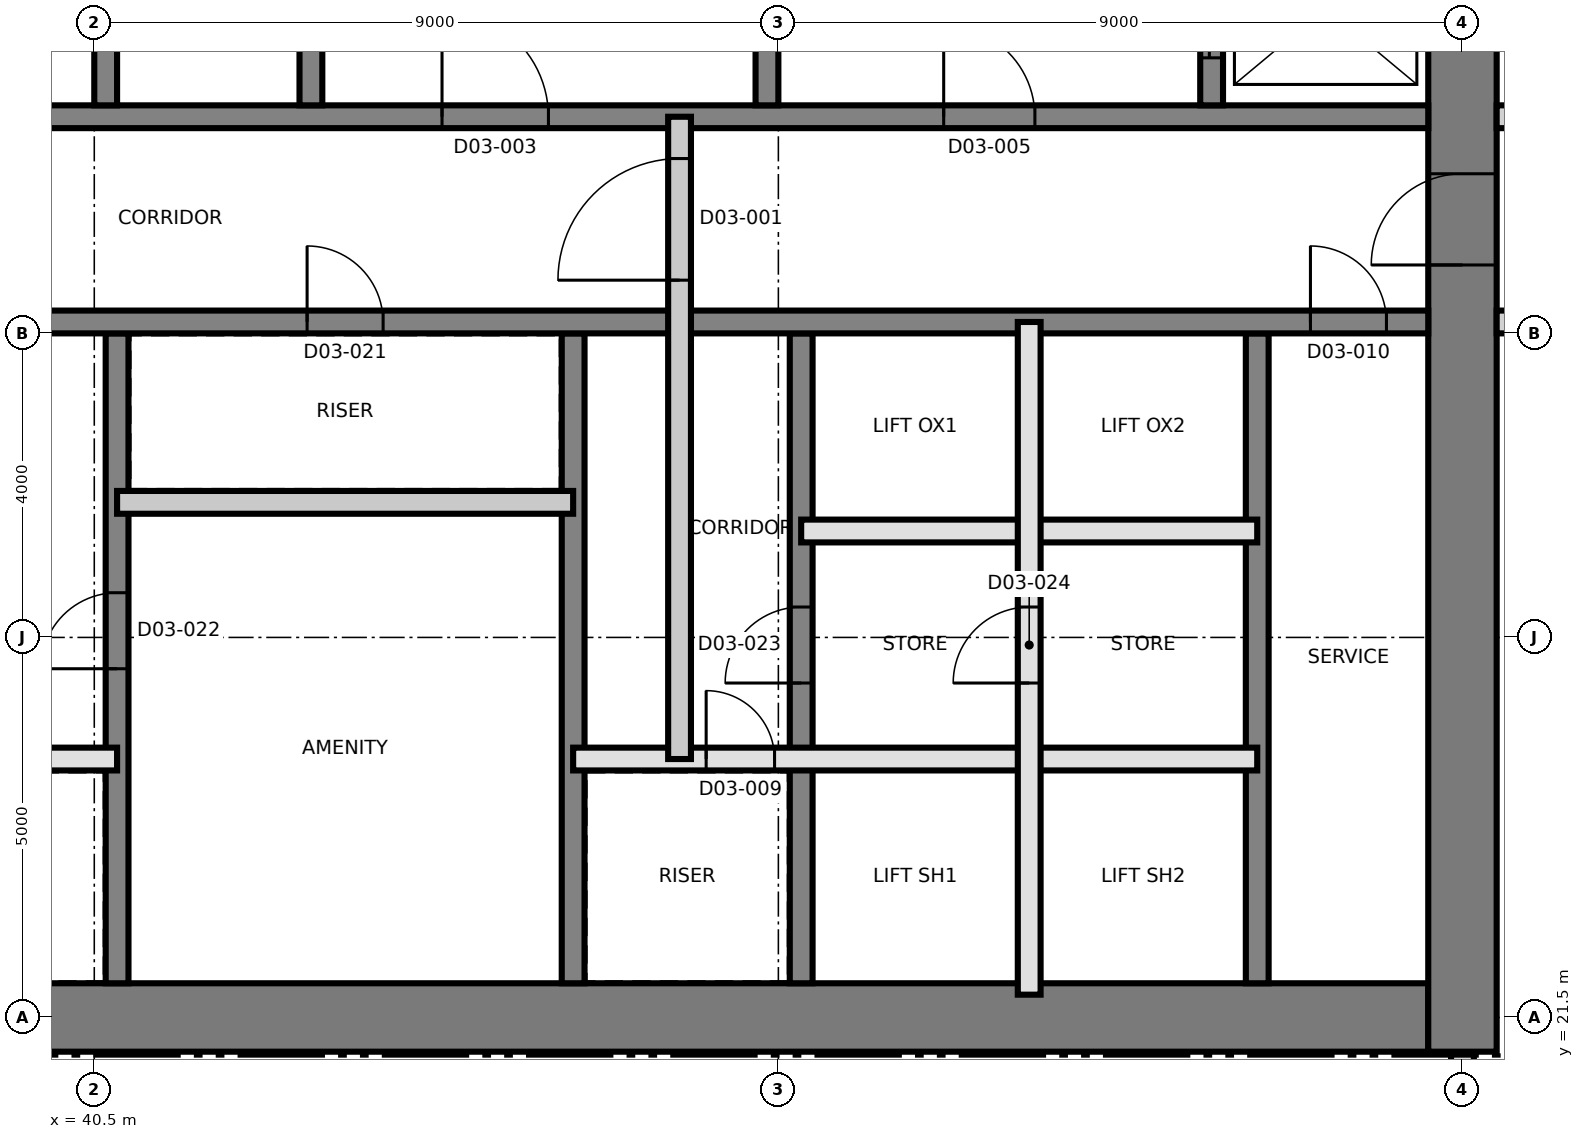
"""IFC4 building model, lengths in metres.
Left out: names, types, materials, properties, quantities, classifications, styles, units other than length and angle.
Written with IfcOpenShell. Run it as: python <this file> out.ifc"""

import sys

from ifc_helpers import new_model, si_unit, direction, frame, frame_2d, origin, place, context, subcontext, project, spatial, rectangle, extrude, element, fill, save


model = new_model("IFC4")
c1 = context("Model", 3, precision=1e-05, world=origin(), true_north=direction((0.0, 1.0)))
c2 = subcontext(c1, "Body", "Model", "MODEL_VIEW")
j1 = project(units=[si_unit("LENGTHUNIT", "METRE"), si_unit("PLANEANGLEUNIT", "RADIAN")], contexts=[c1])
p1 = place(None, origin())
s1 = spatial("IfcSite", under=j1, at=p1, CompositionType="ELEMENT")
p2 = place(p1, origin())
s2 = spatial("IfcBuilding", under=s1, at=p2, CompositionType="ELEMENT")
p3 = place(p2, frame((0.0, 0.0, 59.4)))
s3 = spatial("IfcBuildingStorey", under=s2, at=p3, CompositionType="ELEMENT", Elevation=59.4)
p4 = place(p3, frame((31.05, 21.5, 0.0), z_axis=(0.0, 0.0, 1.0), x_axis=(1.0, 0.0, 0.0)))
e1 = element("IfcWall", 1, at=p4, inside=s3, PredefinedType="SHEAR", context=c2, shape_type="SweptSolid", body=[
    extrude(rectangle(XDim=27.0, YDim=0.9, at=frame_2d((13.5, 0.0))), origin(), (0.0, 0.0, 1.0), 3.7),
])
p5 = place(p3, frame((58.5, 21.05, 0.0), z_axis=(0.0, 0.0, 1.0), x_axis=(0.0, 1.0, 0.0)))
e2 = element("IfcWall", 2, at=p5, inside=s3, PredefinedType="SHEAR", context=c2, shape_type="SweptSolid", body=[
    extrude(rectangle(XDim=18.9, YDim=0.9, at=frame_2d((9.45, 0.0))), origin(), (0.0, 0.0, 1.0), 3.7),
])
p6 = place(p5, frame((10.35, 0.0, 0.0)))
e3 = element("IfcOpeningElement", 3, at=p6, cuts=e2, PredefinedType="OPENING", context=c2, shape_type="SweptSolid", body=[
    extrude(rectangle(XDim=1.2, YDim=2.1, at=frame_2d((0.6, 1.05))), frame((0.0, 0.46, 0.0), z_axis=(0.0, -1.0, 0.0), x_axis=(1.0, 0.0, 0.0)), (0.0, 0.0, 1.0), 0.92),
])
p7 = place(p3, frame((40.8, 21.95, 0.0), z_axis=(0.0, 0.0, 1.0), x_axis=(0.0, 1.0, 0.0)))
e4 = element("IfcWall", 4, at=p7, inside=s3, PredefinedType="SHEAR", context=c2, shape_type="SweptSolid", body=[
    extrude(rectangle(XDim=8.55, YDim=0.3, at=frame_2d((4.275, 0.0))), origin(), (0.0, 0.0, 1.0), 3.7),
])
p8 = place(p7, frame((4.138, 0.0, 0.0)))
e5 = element("IfcOpeningElement", 5, at=p8, cuts=e4, PredefinedType="OPENING", context=c2, shape_type="SweptSolid", body=[
    extrude(rectangle(XDim=1.0, YDim=2.1, at=frame_2d((0.5, 1.05))), frame((0.0, 0.16, 0.0), z_axis=(0.0, -1.0, 0.0), x_axis=(1.0, 0.0, 0.0)), (0.0, 0.0, 1.0), 0.32),
])
p9 = place(p3, frame((46.8, 21.95, 0.0), z_axis=(0.0, 0.0, 1.0), x_axis=(0.0, 1.0, 0.0)))
e6 = element("IfcWall", 6, at=p9, inside=s3, PredefinedType="SHEAR", context=c2, shape_type="SweptSolid", body=[
    extrude(rectangle(XDim=8.55, YDim=0.3, at=frame_2d((4.275, 0.0))), origin(), (0.0, 0.0, 1.0), 3.7),
])
p10 = place(p3, frame((49.8, 21.95, 0.0), z_axis=(0.0, 0.0, 1.0), x_axis=(0.0, 1.0, 0.0)))
e7 = element("IfcWall", 7, at=p10, inside=s3, PredefinedType="SHEAR", context=c2, shape_type="SweptSolid", body=[
    extrude(rectangle(XDim=8.55, YDim=0.3, at=frame_2d((4.275, 0.0))), origin(), (0.0, 0.0, 1.0), 3.7),
])
p11 = place(p10, frame((3.95, 0.0, 0.0)))
e8 = element("IfcOpeningElement", 8, at=p11, cuts=e7, PredefinedType="OPENING", context=c2, shape_type="SweptSolid", body=[
    extrude(rectangle(XDim=1.0, YDim=2.1, at=frame_2d((0.5, 1.05))), frame((0.0, 0.16, 0.0), z_axis=(0.0, -1.0, 0.0), x_axis=(1.0, 0.0, 0.0)), (0.0, 0.0, 1.0), 0.32),
])
p12 = place(p3, frame((55.8, 21.95, 0.0), z_axis=(0.0, 0.0, 1.0), x_axis=(0.0, 1.0, 0.0)))
e9 = element("IfcWall", 9, at=p12, inside=s3, PredefinedType="SHEAR", context=c2, shape_type="SweptSolid", body=[
    extrude(rectangle(XDim=8.55, YDim=0.3, at=frame_2d((4.275, 0.0))), origin(), (0.0, 0.0, 1.0), 3.7),
])
p13 = place(p3, frame((31.95, 30.65, 0.0), z_axis=(0.0, 0.0, 1.0), x_axis=(1.0, 0.0, 0.0)))
e10 = element("IfcWall", 10, at=p13, inside=s3, PredefinedType="SHEAR", context=c2, shape_type="SweptSolid", body=[
    extrude(rectangle(XDim=26.1, YDim=0.3, at=frame_2d((13.05, 0.0))), origin(), (0.0, 0.0, 1.0), 3.7),
])
p14 = place(p13, frame((24.55, 0.0, 0.0)))
e11 = element("IfcOpeningElement", 11, at=p14, cuts=e10, PredefinedType="OPENING", context=c2, shape_type="SweptSolid", body=[
    extrude(rectangle(XDim=1.0, YDim=2.1, at=frame_2d((0.5, 1.05))), frame((0.0, 0.16, 0.0), z_axis=(0.0, -1.0, 0.0), x_axis=(1.0, 0.0, 0.0)), (0.0, 0.0, 1.0), 0.32),
])
p15 = place(p13, frame((11.35, 0.0, 0.0)))
e12 = element("IfcOpeningElement", 12, at=p15, cuts=e10, PredefinedType="OPENING", context=c2, shape_type="SweptSolid", body=[
    extrude(rectangle(XDim=1.0, YDim=2.1, at=frame_2d((0.5, 1.05))), frame((0.0, 0.16, 0.0), z_axis=(0.0, -1.0, 0.0), x_axis=(1.0, 0.0, 0.0)), (0.0, 0.0, 1.0), 0.32),
])
p16 = place(p3, frame((31.95, 33.35, 0.0), z_axis=(0.0, 0.0, 1.0), x_axis=(1.0, 0.0, 0.0)))
e13 = element("IfcWall", 13, at=p16, inside=s3, PredefinedType="SHEAR", context=c2, shape_type="SweptSolid", body=[
    extrude(rectangle(XDim=26.1, YDim=0.3, at=frame_2d((13.05, 0.0))), origin(), (0.0, 0.0, 1.0), 3.7),
])
p17 = place(p16, frame((13.125, 0.0, 0.0)))
e14 = element("IfcOpeningElement", 14, at=p17, cuts=e13, PredefinedType="OPENING", context=c2, shape_type="SweptSolid", body=[
    extrude(rectangle(XDim=1.4, YDim=2.1, at=frame_2d((0.7, 1.05))), frame((0.0, 0.16, 0.0), z_axis=(0.0, -1.0, 0.0), x_axis=(1.0, 0.0, 0.0)), (0.0, 0.0, 1.0), 0.32),
])
p18 = place(p16, frame((5.175, 0.0, 0.0)))
e15 = element("IfcOpeningElement", 15, at=p18, cuts=e13, PredefinedType="OPENING", context=c2, shape_type="SweptSolid", body=[
    extrude(rectangle(XDim=1.2, YDim=2.1, at=frame_2d((0.6, 1.05))), frame((0.0, 0.16, 0.0), z_axis=(0.0, -1.0, 0.0), x_axis=(1.0, 0.0, 0.0)), (0.0, 0.0, 1.0), 0.32),
])
p19 = place(p16, frame((19.725, 0.0, 0.0)))
e16 = element("IfcOpeningElement", 16, at=p19, cuts=e13, PredefinedType="OPENING", context=c2, shape_type="SweptSolid", body=[
    extrude(rectangle(XDim=1.2, YDim=2.1, at=frame_2d((0.6, 1.05))), frame((0.0, 0.16, 0.0), z_axis=(0.0, -1.0, 0.0), x_axis=(1.0, 0.0, 0.0)), (0.0, 0.0, 1.0), 0.32),
])
for number, where, z_axis, x_axis in (
    (17, (40.65, 33.5, 0.0), (0.0, 0.0, 1.0), (0.0, 1.0, 0.0)),
    (18, (43.35, 33.5, 0.0), (0.0, 0.0, 1.0), (0.0, 1.0, 0.0)),
    (19, (49.35, 33.5, 0.0), (0.0, 0.0, 1.0), (0.0, 1.0, 0.0)),
):
    element("IfcWall", number, at=place(p3, frame(where, z_axis=z_axis, x_axis=x_axis)), inside=s3, PredefinedType="SHEAR", context=c2, shape_type="SweptSolid", body=[
        extrude(rectangle(XDim=5.55, YDim=0.3, at=frame_2d((2.775, 0.0))), origin(), (0.0, 0.0, 1.0), 3.7),
    ])
p20 = place(p3, frame((55.2, 33.5, 0.0), z_axis=(0.0, 0.0, 1.0), x_axis=(0.0, 1.0, 0.0)))
e20 = element("IfcWall", 20, at=p20, inside=s3, PredefinedType="SHEAR", context=c2, shape_type="SweptSolid", body=[
    extrude(rectangle(XDim=2.55, YDim=0.3, at=frame_2d((1.275, 0.0))), origin(), (0.0, 0.0, 1.0), 3.7),
])
p21 = place(p20, frame((0.625, 0.0, 0.0)))
e21 = element("IfcOpeningElement", 21, at=p21, cuts=e20, PredefinedType="OPENING", context=c2, shape_type="SweptSolid", body=[
    extrude(rectangle(XDim=1.3, YDim=2.4, at=frame_2d((0.65, 1.2))), frame((0.0, 0.16, 0.0), z_axis=(0.0, -1.0, 0.0), x_axis=(1.0, 0.0, 0.0)), (0.0, 0.0, 1.0), 0.32),
])
p22 = place(p3, frame((31.8, 24.9, 0.0), z_axis=(0.0, 0.0, 1.0), x_axis=(1.0, 0.0, 0.0)))
e22 = element("IfcWall", 22, at=p22, inside=s3, PredefinedType="SOLIDWALL", context=c2, shape_type="SweptSolid", body=[
    extrude(rectangle(XDim=9.0, YDim=0.3, at=frame_2d((4.5, 0.0))), origin(), (0.0, 0.0, 1.0), 3.4),
])
p23 = place(p22, frame((7.05, 0.0, 0.0)))
e23 = element("IfcOpeningElement", 23, at=p23, cuts=e22, PredefinedType="OPENING", context=c2, shape_type="SweptSolid", body=[
    extrude(rectangle(XDim=0.9, YDim=2.1, at=frame_2d((0.45, 1.05))), frame((0.0, 0.16, 0.0), z_axis=(0.0, -1.0, 0.0), x_axis=(1.0, 0.0, 0.0)), (0.0, 0.0, 1.0), 0.32),
])
p24 = place(p22, frame((0.95, 0.0, 0.0)))
e24 = element("IfcOpeningElement", 24, at=p24, cuts=e22, PredefinedType="OPENING", context=c2, shape_type="SweptSolid", body=[
    extrude(rectangle(XDim=1.1, YDim=2.4, at=frame_2d((0.55, 1.2))), frame((0.0, 0.16, 0.0), z_axis=(0.0, -1.0, 0.0), x_axis=(1.0, 0.0, 0.0)), (0.0, 0.0, 1.0), 0.32),
])
p25 = place(p22, frame((3.95, 0.0, 0.0)))
e25 = element("IfcOpeningElement", 25, at=p25, cuts=e22, PredefinedType="OPENING", context=c2, shape_type="SweptSolid", body=[
    extrude(rectangle(XDim=1.1, YDim=2.4, at=frame_2d((0.55, 1.2))), frame((0.0, 0.16, 0.0), z_axis=(0.0, -1.0, 0.0), x_axis=(1.0, 0.0, 0.0)), (0.0, 0.0, 1.0), 0.32),
])
p26 = place(p3, frame((46.8, 24.9, 0.0), z_axis=(0.0, 0.0, 1.0), x_axis=(1.0, 0.0, 0.0)))
e26 = element("IfcWall", 26, at=p26, inside=s3, PredefinedType="SOLIDWALL", context=c2, shape_type="SweptSolid", body=[
    extrude(rectangle(XDim=9.0, YDim=0.3, at=frame_2d((4.5, 0.0))), origin(), (0.0, 0.0, 1.0), 3.4),
])
p27 = place(p26, frame((1.75, 0.0, 0.0)))
e27 = element("IfcOpeningElement", 27, at=p27, cuts=e26, PredefinedType="OPENING", context=c2, shape_type="SweptSolid", body=[
    extrude(rectangle(XDim=0.9, YDim=2.1, at=frame_2d((0.45, 1.05))), frame((0.0, 0.16, 0.0), z_axis=(0.0, -1.0, 0.0), x_axis=(1.0, 0.0, 0.0)), (0.0, 0.0, 1.0), 0.32),
])
p28 = place(p3, frame((49.8, 27.9, 0.0), z_axis=(0.0, 0.0, 1.0), x_axis=(1.0, 0.0, 0.0)))
e28 = element("IfcWall", 28, at=p28, inside=s3, PredefinedType="SOLIDWALL", context=c2, shape_type="SweptSolid", body=[
    extrude(rectangle(XDim=6.0, YDim=0.3, at=frame_2d((3.0, 0.0))), origin(), (0.0, 0.0, 1.0), 3.4),
])
p29 = place(p3, frame((40.8, 28.277, 0.0), z_axis=(0.0, 0.0, 1.0), x_axis=(1.0, 0.0, 0.0)))
e29 = element("IfcWall", 29, at=p29, inside=s3, PredefinedType="PARTITIONING", context=c2, shape_type="SweptSolid", body=[
    extrude(rectangle(XDim=6.0, YDim=0.3, at=frame_2d((3.0, 0.0))), origin(), (0.0, 0.0, 1.0), 3.4),
])
p30 = place(p3, frame((48.2, 24.9, 0.0), z_axis=(0.0, 0.0, 1.0), x_axis=(0.0, 1.0, 0.0)))
e30 = element("IfcWall", 30, at=p30, inside=s3, PredefinedType="PARTITIONING", context=c2, shape_type="SweptSolid", body=[
    extrude(rectangle(XDim=8.45, YDim=0.3, at=frame_2d((4.225, 0.0))), origin(), (0.0, 0.0, 1.0), 3.4),
])
p31 = place(p30, frame((6.3, 0.0, 0.0)))
e31 = element("IfcOpeningElement", 31, at=p31, cuts=e30, PredefinedType="OPENING", context=c2, shape_type="SweptSolid", body=[
    extrude(rectangle(XDim=1.6, YDim=2.1, at=frame_2d((0.8, 1.05))), frame((0.0, 0.16, 0.0), z_axis=(0.0, -1.0, 0.0), x_axis=(1.0, 0.0, 0.0)), (0.0, 0.0, 1.0), 0.32),
])
p32 = place(p3, frame((52.8, 21.8, 0.0), z_axis=(0.0, 0.0, 1.0), x_axis=(0.0, 1.0, 0.0)))
e32 = element("IfcWall", 32, at=p32, inside=s3, PredefinedType="SOLIDWALL", context=c2, shape_type="SweptSolid", body=[
    extrude(rectangle(XDim=8.85, YDim=0.3, at=frame_2d((4.425, 0.0))), origin(), (0.0, 0.0, 1.0), 3.4),
])
p33 = place(p32, frame((4.1, 0.0, 0.0)))
e33 = element("IfcOpeningElement", 33, at=p33, cuts=e32, PredefinedType="OPENING", context=c2, shape_type="SweptSolid", body=[
    extrude(rectangle(XDim=1.0, YDim=2.1, at=frame_2d((0.5, 1.05))), frame((0.0, 0.16, 0.0), z_axis=(0.0, -1.0, 0.0), x_axis=(1.0, 0.0, 0.0)), (0.0, 0.0, 1.0), 0.32),
])
p34 = place(p3, frame((58.95, 30.65, 0.0), z_axis=(0.0, 0.0, 1.0), x_axis=(1.0, 0.0, 0.0)))
e34 = element("IfcWall", 34, at=p34, inside=s3, PredefinedType="PARTITIONING", context=c2, shape_type="SweptSolid", body=[
    extrude(rectangle(XDim=26.38, YDim=0.3, at=frame_2d((13.19, 0.0))), origin(), (0.0, 0.0, 1.0), 3.4),
])
p35 = place(p34, frame((0.685, 0.0, 0.0)))
e35 = element("IfcOpeningElement", 35, at=p35, cuts=e34, PredefinedType="OPENING", context=c2, shape_type="SweptSolid", body=[
    extrude(rectangle(XDim=1.2, YDim=2.1, at=frame_2d((0.6, 1.05))), frame((0.0, 0.16, 0.0), z_axis=(0.0, -1.0, 0.0), x_axis=(1.0, 0.0, 0.0)), (0.0, 0.0, 1.0), 0.32),
])
p36 = place(p34, frame((3.935, 0.0, 0.0)))
e36 = element("IfcOpeningElement", 36, at=p36, cuts=e34, PredefinedType="OPENING", context=c2, shape_type="SweptSolid", body=[
    extrude(rectangle(XDim=1.0, YDim=2.1, at=frame_2d((0.5, 1.05))), frame((0.0, 0.16, 0.0), z_axis=(0.0, -1.0, 0.0), x_axis=(1.0, 0.0, 0.0)), (0.0, 0.0, 1.0), 0.32),
])
p37 = place(p34, frame((9.685, 0.0, 0.0)))
e37 = element("IfcOpeningElement", 37, at=p37, cuts=e34, PredefinedType="OPENING", context=c2, shape_type="SweptSolid", body=[
    extrude(rectangle(XDim=1.2, YDim=2.1, at=frame_2d((0.6, 1.05))), frame((0.0, 0.16, 0.0), z_axis=(0.0, -1.0, 0.0), x_axis=(1.0, 0.0, 0.0)), (0.0, 0.0, 1.0), 0.32),
])
p38 = place(p34, frame((12.935, 0.0, 0.0)))
e38 = element("IfcOpeningElement", 38, at=p38, cuts=e34, PredefinedType="OPENING", context=c2, shape_type="SweptSolid", body=[
    extrude(rectangle(XDim=1.0, YDim=2.1, at=frame_2d((0.5, 1.05))), frame((0.0, 0.16, 0.0), z_axis=(0.0, -1.0, 0.0), x_axis=(1.0, 0.0, 0.0)), (0.0, 0.0, 1.0), 0.32),
])
p39 = place(p34, frame((21.55, 0.0, 0.0)))
e39 = element("IfcOpeningElement", 39, at=p39, cuts=e34, PredefinedType="OPENING", context=c2, shape_type="SweptSolid", body=[
    extrude(rectangle(XDim=1.0, YDim=2.4, at=frame_2d((0.5, 1.2))), frame((0.0, 0.16, 0.0), z_axis=(0.0, -1.0, 0.0), x_axis=(1.0, 0.0, 0.0)), (0.0, 0.0, 1.0), 0.32),
])
p40 = place(p3, frame((58.95, 33.35, 0.0), z_axis=(0.0, 0.0, 1.0), x_axis=(1.0, 0.0, 0.0)))
e40 = element("IfcWall", 40, at=p40, inside=s3, PredefinedType="PARTITIONING", context=c2, shape_type="SweptSolid", body=[
    extrude(rectangle(XDim=26.38, YDim=0.3, at=frame_2d((13.19, 0.0))), origin(), (0.0, 0.0, 1.0), 3.4),
])
p41 = place(p40, frame((0.685, 0.0, 0.0)))
e41 = element("IfcOpeningElement", 41, at=p41, cuts=e40, PredefinedType="OPENING", context=c2, shape_type="SweptSolid", body=[
    extrude(rectangle(XDim=1.2, YDim=2.1, at=frame_2d((0.6, 1.05))), frame((0.0, 0.16, 0.0), z_axis=(0.0, -1.0, 0.0), x_axis=(1.0, 0.0, 0.0)), (0.0, 0.0, 1.0), 0.32),
])
p42 = place(p40, frame((3.935, 0.0, 0.0)))
e42 = element("IfcOpeningElement", 42, at=p42, cuts=e40, PredefinedType="OPENING", context=c2, shape_type="SweptSolid", body=[
    extrude(rectangle(XDim=1.0, YDim=2.1, at=frame_2d((0.5, 1.05))), frame((0.0, 0.16, 0.0), z_axis=(0.0, -1.0, 0.0), x_axis=(1.0, 0.0, 0.0)), (0.0, 0.0, 1.0), 0.32),
])
p43 = place(p40, frame((14.2, 0.0, 0.0)))
e43 = element("IfcOpeningElement", 43, at=p43, cuts=e40, PredefinedType="OPENING", context=c2, shape_type="SweptSolid", body=[
    extrude(rectangle(XDim=1.0, YDim=2.4, at=frame_2d((0.5, 1.2))), frame((0.0, 0.16, 0.0), z_axis=(0.0, -1.0, 0.0), x_axis=(1.0, 0.0, 0.0)), (0.0, 0.0, 1.0), 0.32),
])
p44 = place(p40, frame((19.25, 0.0, 0.0)))
e44 = element("IfcOpeningElement", 44, at=p44, cuts=e40, PredefinedType="OPENING", context=c2, shape_type="SweptSolid", body=[
    extrude(rectangle(XDim=1.2, YDim=2.1, at=frame_2d((0.6, 1.05))), frame((0.0, 0.16, 0.0), z_axis=(0.0, -1.0, 0.0), x_axis=(1.0, 0.0, 0.0)), (0.0, 0.0, 1.0), 0.32),
])
p45 = place(p40, frame((22.5, 0.0, 0.0)))
e45 = element("IfcOpeningElement", 45, at=p45, cuts=e40, PredefinedType="OPENING", context=c2, shape_type="SweptSolid", body=[
    extrude(rectangle(XDim=1.0, YDim=2.1, at=frame_2d((0.5, 1.05))), frame((0.0, 0.16, 0.0), z_axis=(0.0, -1.0, 0.0), x_axis=(1.0, 0.0, 0.0)), (0.0, 0.0, 1.0), 0.32),
])
p46 = place(p3, frame((58.5, 19.705, 0.0), z_axis=(0.0, 0.0, 1.0), x_axis=(0.0, 1.0, 0.0)))
e46 = element("IfcWall", 46, at=p46, inside=s3, PredefinedType="PARTITIONING", context=c2, shape_type="SweptSolid", body=[
    extrude(rectangle(XDim=1.325, YDim=0.3, at=frame_2d((0.663, 0.0))), origin(), (0.0, 0.0, 1.0), 3.4),
])
p47 = place(p31, origin())
e47 = element("IfcDoor", 47, at=p47, inside=s3, OperationType="SINGLE_SWING_LEFT", PredefinedType="DOOR", context=c2, shape_type="SweptSolid", body=[
    extrude(rectangle(XDim=1.6, YDim=2.1, at=frame_2d((0.8, 1.05))), frame((0.0, 0.025, 0.0), z_axis=(0.0, -1.0, 0.0), x_axis=(1.0, 0.0, 0.0)), (0.0, 0.0, 1.0), 0.05),
])
fill(e31, e47)
p48 = place(p17, origin())
e48 = element("IfcDoor", 48, at=p48, inside=s3, OperationType="SINGLE_SWING_RIGHT", PredefinedType="DOOR", context=c2, shape_type="SweptSolid", body=[
    extrude(rectangle(XDim=1.4, YDim=2.1, at=frame_2d((0.7, 1.05))), frame((0.0, 0.025, 0.0), z_axis=(0.0, -1.0, 0.0), x_axis=(1.0, 0.0, 0.0)), (0.0, 0.0, 1.0), 0.05),
])
fill(e14, e48)
p49 = place(p19, origin())
e49 = element("IfcDoor", 49, at=p49, inside=s3, OperationType="SINGLE_SWING_RIGHT", PredefinedType="DOOR", context=c2, shape_type="SweptSolid", body=[
    extrude(rectangle(XDim=1.2, YDim=2.1, at=frame_2d((0.6, 1.05))), frame((0.0, 0.025, 0.0), z_axis=(0.0, -1.0, 0.0), x_axis=(1.0, 0.0, 0.0)), (0.0, 0.0, 1.0), 0.05),
])
fill(e16, e49)
p50 = place(p27, origin())
e50 = element("IfcDoor", 50, at=p50, inside=s3, OperationType="SINGLE_SWING_RIGHT", PredefinedType="DOOR", context=c2, shape_type="SweptSolid", body=[
    extrude(rectangle(XDim=0.9, YDim=2.1, at=frame_2d((0.45, 1.05))), frame((0.0, 0.025, 0.0), z_axis=(0.0, -1.0, 0.0), x_axis=(1.0, 0.0, 0.0)), (0.0, 0.0, 1.0), 0.05),
])
fill(e27, e50)
p51 = place(p14, origin())
e51 = element("IfcDoor", 51, at=p51, inside=s3, OperationType="SINGLE_SWING_LEFT", PredefinedType="DOOR", context=c2, shape_type="SweptSolid", body=[
    extrude(rectangle(XDim=1.0, YDim=2.1, at=frame_2d((0.5, 1.05))), frame((0.0, 0.025, 0.0), z_axis=(0.0, -1.0, 0.0), x_axis=(1.0, 0.0, 0.0)), (0.0, 0.0, 1.0), 0.05),
])
fill(e11, e51)
p52 = place(p6, origin())
e52 = element("IfcDoor", 52, at=p52, inside=s3, OperationType="SINGLE_SWING_LEFT", PredefinedType="DOOR", context=c2, shape_type="SweptSolid", body=[
    extrude(rectangle(XDim=1.2, YDim=2.1, at=frame_2d((0.6, 1.05))), frame((0.0, 0.025, 0.0), z_axis=(0.0, -1.0, 0.0), x_axis=(1.0, 0.0, 0.0)), (0.0, 0.0, 1.0), 0.05),
])
fill(e3, e52)
p53 = place(p21, origin())
e53 = element("IfcDoor", 53, at=p53, inside=s3, OperationType="SLIDING_TO_LEFT", PredefinedType="DOOR", context=c2, shape_type="SweptSolid", body=[
    extrude(rectangle(XDim=1.3, YDim=2.4, at=frame_2d((0.65, 1.2))), frame((0.0, 0.025, 0.0), z_axis=(0.0, -1.0, 0.0), x_axis=(1.0, 0.0, 0.0)), (0.0, 0.0, 1.0), 0.05),
])
fill(e21, e53)
p54 = place(p15, origin())
e54 = element("IfcDoor", 54, at=p54, inside=s3, OperationType="SINGLE_SWING_LEFT", PredefinedType="DOOR", context=c2, shape_type="SweptSolid", body=[
    extrude(rectangle(XDim=1.0, YDim=2.1, at=frame_2d((0.5, 1.05))), frame((0.0, 0.025, 0.0), z_axis=(0.0, -1.0, 0.0), x_axis=(1.0, 0.0, 0.0)), (0.0, 0.0, 1.0), 0.05),
])
fill(e12, e54)
p55 = place(p8, origin())
e55 = element("IfcDoor", 55, at=p55, inside=s3, OperationType="SINGLE_SWING_RIGHT", PredefinedType="DOOR", context=c2, shape_type="SweptSolid", body=[
    extrude(rectangle(XDim=1.0, YDim=2.1, at=frame_2d((0.5, 1.05))), frame((0.0, 0.025, 0.0), z_axis=(0.0, -1.0, 0.0), x_axis=(1.0, 0.0, 0.0)), (0.0, 0.0, 1.0), 0.05),
])
fill(e5, e55)
p56 = place(p11, origin())
e56 = element("IfcDoor", 56, at=p56, inside=s3, OperationType="SINGLE_SWING_LEFT", PredefinedType="DOOR", context=c2, shape_type="SweptSolid", body=[
    extrude(rectangle(XDim=1.0, YDim=2.1, at=frame_2d((0.5, 1.05))), frame((0.0, 0.025, 0.0), z_axis=(0.0, -1.0, 0.0), x_axis=(1.0, 0.0, 0.0)), (0.0, 0.0, 1.0), 0.05),
])
fill(e8, e56)
p57 = place(p33, origin())
e57 = element("IfcDoor", 57, at=p57, inside=s3, OperationType="SINGLE_SWING_RIGHT", PredefinedType="DOOR", context=c2, shape_type="SweptSolid", body=[
    extrude(rectangle(XDim=1.0, YDim=2.1, at=frame_2d((0.5, 1.05))), frame((0.0, 0.025, 0.0), z_axis=(0.0, -1.0, 0.0), x_axis=(1.0, 0.0, 0.0)), (0.0, 0.0, 1.0), 0.05),
])
fill(e33, e57)
save(model, sys.argv[1])
